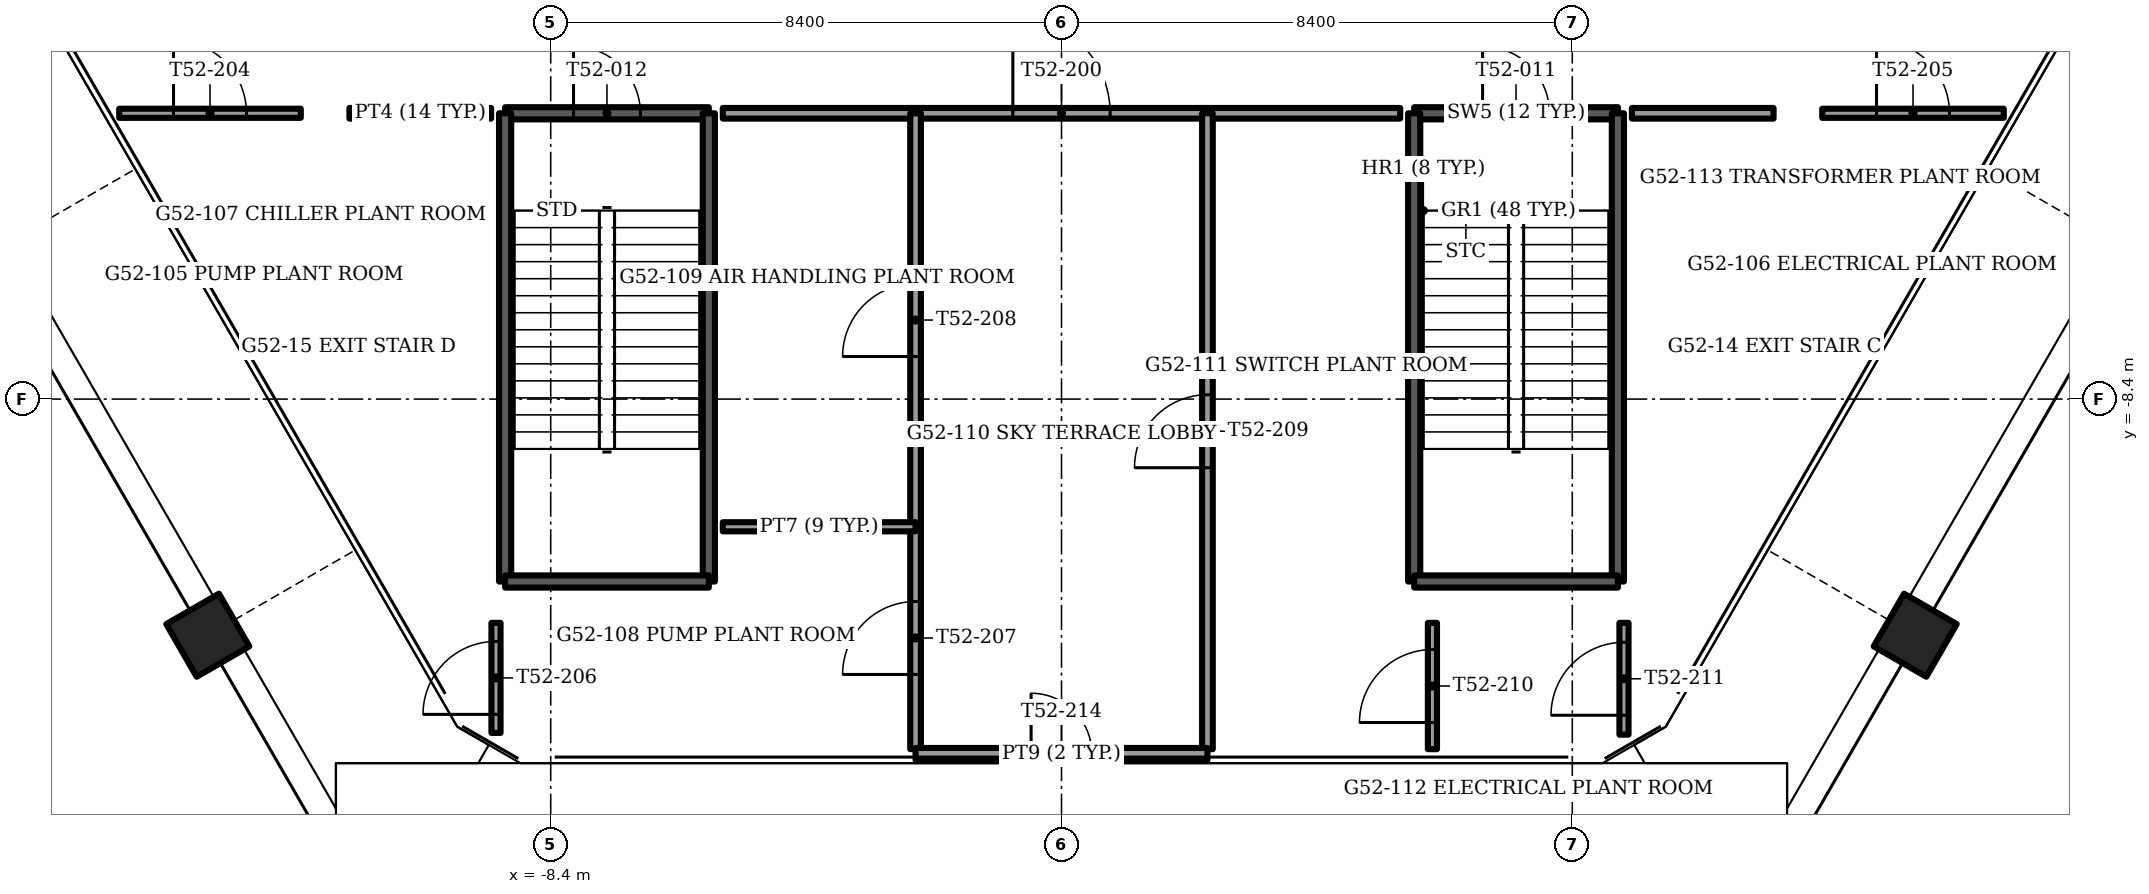
"""IFC4 building model, lengths in metres.
Left out: names, types, materials, properties, quantities, classifications, styles, units other than length and angle.
Written with IfcOpenShell. Run it as: python <this file> out.ifc"""

import sys

from ifc_helpers import new_model, si_unit, direction, frame, frame_2d, origin, origin_2d, place, context, subcontext, project, spatial, rectangle, extrude, element, fill, save


model = new_model("IFC4")
c1 = context("Model", 3, precision=1e-05, world=origin(), true_north=direction((0.0, 1.0)))
c2 = subcontext(c1, "Body", "Model", "MODEL_VIEW")
j1 = project(units=[si_unit("LENGTHUNIT", "METRE"), si_unit("PLANEANGLEUNIT", "RADIAN")], contexts=[c1])
p1 = place(None, origin())
s1 = spatial("IfcSite", under=j1, at=p1, CompositionType="ELEMENT")
p2 = place(p1, origin())
s2 = spatial("IfcBuilding", under=s1, at=p2, CompositionType="ELEMENT")
p3 = place(p2, frame((0.0, 0.0, 209.5)))
s3 = spatial("IfcBuildingStorey", under=s2, at=p3, CompositionType="ELEMENT", Elevation=209.5)
for number, where, z_axis, x_axis in (
    (1, (-14.039, -12.283, -1.2), (0.0, 0.0, 1.0), (-0.5, 0.866, 0.0)),
    (2, (14.039, -12.283, -1.2), (0.0, 0.0, 1.0), (-0.5, -0.866, 0.0)),
):
    element("IfcColumn", number, at=place(p3, frame(where, z_axis=z_axis, x_axis=x_axis)), inside=s3, PredefinedType="COLUMN", context=c2, shape_type="SweptSolid", body=[
        extrude(rectangle(XDim=1.0, YDim=1.0, at=origin_2d()), origin(), (0.0, 0.0, 1.0), 5.0),
    ])
p4 = place(p3, frame((5.8, -3.7, -0.3), z_axis=(0.0, 0.0, 1.0), x_axis=(1.0, 0.0, 0.0)))
e3 = element("IfcWall", 3, at=p4, inside=s3, PredefinedType="SOLIDWALL", context=c2, shape_type="SweptSolid", body=[
    extrude(rectangle(XDim=3.35, YDim=0.2, at=frame_2d((1.675, 0.0))), origin(), (0.0, 0.0, 1.0), 5.0),
])
p5 = place(p4, frame((1.125, 0.0, 0.0)))
e4 = element("IfcOpeningElement", 4, at=p5, cuts=e3, PredefinedType="OPENING", context=c2, shape_type="SweptSolid", body=[
    extrude(rectangle(XDim=1.1, YDim=2.1, at=frame_2d((0.55, 1.05))), frame((0.0, 0.1, 0.0), z_axis=(0.0, -1.0, 0.0), x_axis=(1.0, 0.0, 0.0)), (0.0, 0.0, 1.0), 0.2),
])
for number, where, z_axis, x_axis in (
    (5, (5.8, -3.7, -0.3), (0.0, 0.0, 1.0), (0.0, -1.0, 0.0)),
    (6, (9.15, -3.7, -0.3), (0.0, 0.0, 1.0), (0.0, -1.0, 0.0)),
):
    element("IfcWall", number, at=place(p3, frame(where, z_axis=z_axis, x_axis=x_axis)), inside=s3, PredefinedType="SOLIDWALL", context=c2, shape_type="SweptSolid", body=[
        extrude(rectangle(XDim=7.7, YDim=0.2, at=frame_2d((3.85, 0.0))), origin(), (0.0, 0.0, 1.0), 5.0),
    ])
p6 = place(p3, frame((5.8, -11.4, -0.3), z_axis=(0.0, 0.0, 1.0), x_axis=(1.0, 0.0, 0.0)))
e7 = element("IfcWall", 7, at=p6, inside=s3, PredefinedType="SOLIDWALL", context=c2, shape_type="SweptSolid", body=[
    extrude(rectangle(XDim=3.35, YDim=0.2, at=frame_2d((1.675, 0.0))), origin(), (0.0, 0.0, 1.0), 5.0),
])
p7 = place(p3, frame((-9.15, -3.7, -0.3), z_axis=(0.0, 0.0, 1.0), x_axis=(1.0, 0.0, 0.0)))
e8 = element("IfcWall", 8, at=p7, inside=s3, PredefinedType="SOLIDWALL", context=c2, shape_type="SweptSolid", body=[
    extrude(rectangle(XDim=3.35, YDim=0.2, at=frame_2d((1.675, 0.0))), origin(), (0.0, 0.0, 1.0), 5.0),
])
p8 = place(p7, frame((1.125, 0.0, 0.0)))
e9 = element("IfcOpeningElement", 9, at=p8, cuts=e8, PredefinedType="OPENING", context=c2, shape_type="SweptSolid", body=[
    extrude(rectangle(XDim=1.1, YDim=2.1, at=frame_2d((0.55, 1.05))), frame((0.0, 0.1, 0.0), z_axis=(0.0, -1.0, 0.0), x_axis=(1.0, 0.0, 0.0)), (0.0, 0.0, 1.0), 0.2),
])
for number, where, z_axis, x_axis in (
    (10, (-9.15, -3.7, -0.3), (0.0, 0.0, 1.0), (0.0, -1.0, 0.0)),
    (11, (-5.8, -3.7, -0.3), (0.0, 0.0, 1.0), (0.0, -1.0, 0.0)),
):
    element("IfcWall", number, at=place(p3, frame(where, z_axis=z_axis, x_axis=x_axis)), inside=s3, PredefinedType="SOLIDWALL", context=c2, shape_type="SweptSolid", body=[
        extrude(rectangle(XDim=7.7, YDim=0.2, at=frame_2d((3.85, 0.0))), origin(), (0.0, 0.0, 1.0), 5.0),
    ])
p9 = place(p3, frame((-9.15, -11.4, -0.3), z_axis=(0.0, 0.0, 1.0), x_axis=(1.0, 0.0, 0.0)))
e12 = element("IfcWall", 12, at=p9, inside=s3, PredefinedType="SOLIDWALL", context=c2, shape_type="SweptSolid", body=[
    extrude(rectangle(XDim=3.35, YDim=0.2, at=frame_2d((1.675, 0.0))), origin(), (0.0, 0.0, 1.0), 5.0),
])
p10 = place(p3, frame((-11.71, -3.7, 0.0), z_axis=(0.0, 0.0, 1.0), x_axis=(1.0, 0.0, 0.0)))
e13 = element("IfcWall", 13, at=p10, inside=s3, PredefinedType="PARTITIONING", context=c2, shape_type="SweptSolid", body=[
    extrude(rectangle(XDim=2.33, YDim=0.175, at=frame_2d((1.165, 0.0))), origin(), (0.0, 0.0, 1.0), 4.7),
])
p11 = place(p3, frame((-5.57, -3.7, 0.0), z_axis=(0.0, 0.0, 1.0), x_axis=(1.0, 0.0, 0.0)))
e14 = element("IfcWall", 14, at=p11, inside=s3, PredefinedType="PARTITIONING", context=c2, shape_type="SweptSolid", body=[
    extrude(rectangle(XDim=11.14, YDim=0.175, at=frame_2d((5.57, 0.0))), origin(), (0.0, 0.0, 1.0), 4.7),
])
p12 = place(p11, frame((4.77, 0.0, 0.0)))
e15 = element("IfcOpeningElement", 15, at=p12, cuts=e14, PredefinedType="OPENING", context=c2, shape_type="SweptSolid", body=[
    extrude(rectangle(XDim=1.6, YDim=2.1, at=frame_2d((0.8, 1.05))), frame((0.0, 0.087, 0.0), z_axis=(0.0, -1.0, 0.0), x_axis=(1.0, 0.0, 0.0)), (0.0, 0.0, 1.0), 0.175),
])
p13 = place(p3, frame((9.38, -3.7, 0.0), z_axis=(0.0, 0.0, 1.0), x_axis=(1.0, 0.0, 0.0)))
e16 = element("IfcWall", 16, at=p13, inside=s3, PredefinedType="PARTITIONING", context=c2, shape_type="SweptSolid", body=[
    extrude(rectangle(XDim=2.33, YDim=0.175, at=frame_2d((1.165, 0.0))), origin(), (0.0, 0.0, 1.0), 4.7),
])
p14 = place(p3, frame((-2.4, -14.157, 0.0), z_axis=(0.0, 0.0, 1.0), x_axis=(0.0, 1.0, 0.0)))
e17 = element("IfcWall", 17, at=p14, inside=s3, PredefinedType="PARTITIONING", context=c2, shape_type="SweptSolid", body=[
    extrude(rectangle(XDim=10.457, YDim=0.175, at=frame_2d((5.229, 0.0))), origin(), (0.0, 0.0, 1.0), 4.7),
])
p15 = place(p14, frame((1.229, 0.0, 0.0)))
e18 = element("IfcOpeningElement", 18, at=p15, cuts=e17, PredefinedType="OPENING", context=c2, shape_type="SweptSolid", body=[
    extrude(rectangle(XDim=1.2, YDim=2.1, at=frame_2d((0.6, 1.05))), frame((0.0, 0.087, 0.0), z_axis=(0.0, -1.0, 0.0), x_axis=(1.0, 0.0, 0.0)), (0.0, 0.0, 1.0), 0.175),
])
p16 = place(p14, frame((6.457, 0.0, 0.0)))
e19 = element("IfcOpeningElement", 19, at=p16, cuts=e17, PredefinedType="OPENING", context=c2, shape_type="SweptSolid", body=[
    extrude(rectangle(XDim=1.2, YDim=2.1, at=frame_2d((0.6, 1.05))), frame((0.0, 0.087, 0.0), z_axis=(0.0, -1.0, 0.0), x_axis=(1.0, 0.0, 0.0)), (0.0, 0.0, 1.0), 0.175),
])
p17 = place(p3, frame((2.4, -14.157, 0.0), z_axis=(0.0, 0.0, 1.0), x_axis=(0.0, 1.0, 0.0)))
e20 = element("IfcWall", 20, at=p17, inside=s3, PredefinedType="PARTITIONING", context=c2, shape_type="SweptSolid", body=[
    extrude(rectangle(XDim=10.457, YDim=0.175, at=frame_2d((5.229, 0.0))), origin(), (0.0, 0.0, 1.0), 4.7),
])
p18 = place(p17, frame((4.629, 0.0, 0.0)))
e21 = element("IfcOpeningElement", 21, at=p18, cuts=e20, PredefinedType="OPENING", context=c2, shape_type="SweptSolid", body=[
    extrude(rectangle(XDim=1.2, YDim=2.1, at=frame_2d((0.6, 1.05))), frame((0.0, 0.087, 0.0), z_axis=(0.0, -1.0, 0.0), x_axis=(1.0, 0.0, 0.0)), (0.0, 0.0, 1.0), 0.175),
])
p19 = place(p3, frame((-5.57, -10.5, 0.0), z_axis=(0.0, 0.0, 1.0), x_axis=(1.0, 0.0, 0.0)))
e22 = element("IfcWall", 22, at=p19, inside=s3, PredefinedType="PARTITIONING", context=c2, shape_type="SweptSolid", body=[
    extrude(rectangle(XDim=3.17, YDim=0.15, at=frame_2d((1.585, 0.0))), origin(), (0.0, 0.0, 1.0), 4.7),
])
p20 = place(p3, frame((-15.496, -3.7, 0.0), z_axis=(0.0, 0.0, 1.0), x_axis=(1.0, 0.0, 0.0)))
e23 = element("IfcWall", 23, at=p20, inside=s3, PredefinedType="PARTITIONING", context=c2, shape_type="SweptSolid", body=[
    extrude(rectangle(XDim=2.986, YDim=0.15, at=frame_2d((1.493, 0.0))), origin(), (0.0, 0.0, 1.0), 4.7),
])
p21 = place(p20, frame((0.893, 0.0, 0.0)))
e24 = element("IfcOpeningElement", 24, at=p21, cuts=e23, PredefinedType="OPENING", context=c2, shape_type="SweptSolid", body=[
    extrude(rectangle(XDim=1.2, YDim=2.1, at=frame_2d((0.6, 1.05))), frame((0.0, 0.075, 0.0), z_axis=(0.0, -1.0, 0.0), x_axis=(1.0, 0.0, 0.0)), (0.0, 0.0, 1.0), 0.15),
])
p22 = place(p3, frame((12.51, -3.7, 0.0), z_axis=(0.0, 0.0, 1.0), x_axis=(1.0, 0.0, 0.0)))
e25 = element("IfcWall", 25, at=p22, inside=s3, PredefinedType="PARTITIONING", context=c2, shape_type="SweptSolid", body=[
    extrude(rectangle(XDim=2.986, YDim=0.15, at=frame_2d((1.493, 0.0))), origin(), (0.0, 0.0, 1.0), 4.7),
])
p23 = place(p22, frame((0.893, 0.0, 0.0)))
e26 = element("IfcOpeningElement", 26, at=p23, cuts=e25, PredefinedType="OPENING", context=c2, shape_type="SweptSolid", body=[
    extrude(rectangle(XDim=1.2, YDim=2.1, at=frame_2d((0.6, 1.05))), frame((0.0, 0.075, 0.0), z_axis=(0.0, -1.0, 0.0), x_axis=(1.0, 0.0, 0.0)), (0.0, 0.0, 1.0), 0.15),
])
p24 = place(p3, frame((-9.3, -13.89, 0.0), z_axis=(0.0, 0.0, 1.0), x_axis=(0.0, 1.0, 0.0)))
e27 = element("IfcWall", 27, at=p24, inside=s3, PredefinedType="PARTITIONING", context=c2, shape_type="SweptSolid", body=[
    extrude(rectangle(XDim=1.81, YDim=0.15, at=frame_2d((0.905, 0.0))), origin(), (0.0, 0.0, 1.0), 4.7),
])
p25 = place(p24, frame((0.305, 0.0, 0.0)))
e28 = element("IfcOpeningElement", 28, at=p25, cuts=e27, PredefinedType="OPENING", context=c2, shape_type="SweptSolid", body=[
    extrude(rectangle(XDim=1.2, YDim=2.1, at=frame_2d((0.6, 1.05))), frame((0.0, 0.075, 0.0), z_axis=(0.0, -1.0, 0.0), x_axis=(1.0, 0.0, 0.0)), (0.0, 0.0, 1.0), 0.15),
])
p26 = place(p3, frame((6.1, -14.157, 0.0), z_axis=(0.0, 0.0, 1.0), x_axis=(0.0, 1.0, 0.0)))
e29 = element("IfcWall", 29, at=p26, inside=s3, PredefinedType="PARTITIONING", context=c2, shape_type="SweptSolid", body=[
    extrude(rectangle(XDim=2.077, YDim=0.15, at=frame_2d((1.039, 0.0))), origin(), (0.0, 0.0, 1.0), 4.7),
])
p27 = place(p26, frame((0.439, 0.0, 0.0)))
e30 = element("IfcOpeningElement", 30, at=p27, cuts=e29, PredefinedType="OPENING", context=c2, shape_type="SweptSolid", body=[
    extrude(rectangle(XDim=1.2, YDim=2.1, at=frame_2d((0.6, 1.05))), frame((0.0, 0.075, 0.0), z_axis=(0.0, -1.0, 0.0), x_axis=(1.0, 0.0, 0.0)), (0.0, 0.0, 1.0), 0.15),
])
p28 = place(p3, frame((9.25, -13.919, 0.0), z_axis=(0.0, 0.0, 1.0), x_axis=(0.0, 1.0, 0.0)))
e31 = element("IfcWall", 31, at=p28, inside=s3, PredefinedType="PARTITIONING", context=c2, shape_type="SweptSolid", body=[
    extrude(rectangle(XDim=1.839, YDim=0.15, at=frame_2d((0.919, 0.0))), origin(), (0.0, 0.0, 1.0), 4.7),
])
p29 = place(p28, frame((0.319, 0.0, 0.0)))
e32 = element("IfcOpeningElement", 32, at=p29, cuts=e31, PredefinedType="OPENING", context=c2, shape_type="SweptSolid", body=[
    extrude(rectangle(XDim=1.2, YDim=2.1, at=frame_2d((0.6, 1.05))), frame((0.0, 0.075, 0.0), z_axis=(0.0, -1.0, 0.0), x_axis=(1.0, 0.0, 0.0)), (0.0, 0.0, 1.0), 0.15),
])
p30 = place(p3, frame((-2.4, -14.237, 0.0), z_axis=(0.0, 0.0, 1.0), x_axis=(1.0, 0.0, 0.0)))
e33 = element("IfcWall", 33, at=p30, inside=s3, PredefinedType="PARTITIONING", context=c2, shape_type="SweptSolid", body=[
    extrude(rectangle(XDim=4.8, YDim=0.2, at=frame_2d((2.4, 0.0))), origin(), (0.0, 0.0, 1.0), 4.7),
])
p31 = place(p30, frame((1.9, 0.0, 0.0)))
e34 = element("IfcOpeningElement", 34, at=p31, cuts=e33, PredefinedType="OPENING", context=c2, shape_type="SweptSolid", body=[
    extrude(rectangle(XDim=1.0, YDim=2.1, at=frame_2d((0.5, 1.05))), frame((0.0, 0.1, 0.0), z_axis=(0.0, -1.0, 0.0), x_axis=(1.0, 0.0, 0.0)), (0.0, 0.0, 1.0), 0.2),
])
p32 = place(p5, origin())
e35 = element("IfcDoor", 35, at=p32, inside=s3, OperationType="SINGLE_SWING_LEFT", PredefinedType="DOOR", context=c2, shape_type="SweptSolid", body=[
    extrude(rectangle(XDim=1.1, YDim=2.1, at=frame_2d((0.55, 1.05))), frame((0.0, 0.025, 0.0), z_axis=(0.0, -1.0, 0.0), x_axis=(1.0, 0.0, 0.0)), (0.0, 0.0, 1.0), 0.05),
])
fill(e4, e35)
p33 = place(p8, origin())
e36 = element("IfcDoor", 36, at=p33, inside=s3, OperationType="SINGLE_SWING_LEFT", PredefinedType="DOOR", context=c2, shape_type="SweptSolid", body=[
    extrude(rectangle(XDim=1.1, YDim=2.1, at=frame_2d((0.55, 1.05))), frame((0.0, 0.025, 0.0), z_axis=(0.0, -1.0, 0.0), x_axis=(1.0, 0.0, 0.0)), (0.0, 0.0, 1.0), 0.05),
])
fill(e9, e36)
p34 = place(p12, origin())
e37 = element("IfcDoor", 37, at=p34, inside=s3, OperationType="DOUBLE_DOOR_SINGLE_SWING", PredefinedType="DOOR", context=c2, shape_type="SweptSolid", body=[
    extrude(rectangle(XDim=1.6, YDim=2.1, at=frame_2d((0.8, 1.05))), frame((0.0, 0.025, 0.0), z_axis=(0.0, -1.0, 0.0), x_axis=(1.0, 0.0, 0.0)), (0.0, 0.0, 1.0), 0.05),
])
fill(e15, e37)
p35 = place(p21, origin())
e38 = element("IfcDoor", 38, at=p35, inside=s3, OperationType="SINGLE_SWING_RIGHT", PredefinedType="DOOR", context=c2, shape_type="SweptSolid", body=[
    extrude(rectangle(XDim=1.2, YDim=2.1, at=frame_2d((0.6, 1.05))), frame((0.0, 0.025, 0.0), z_axis=(0.0, -1.0, 0.0), x_axis=(1.0, 0.0, 0.0)), (0.0, 0.0, 1.0), 0.05),
])
fill(e24, e38)
p36 = place(p23, origin())
e39 = element("IfcDoor", 39, at=p36, inside=s3, OperationType="SINGLE_SWING_LEFT", PredefinedType="DOOR", context=c2, shape_type="SweptSolid", body=[
    extrude(rectangle(XDim=1.2, YDim=2.1, at=frame_2d((0.6, 1.05))), frame((0.0, 0.025, 0.0), z_axis=(0.0, -1.0, 0.0), x_axis=(1.0, 0.0, 0.0)), (0.0, 0.0, 1.0), 0.05),
])
fill(e26, e39)
p37 = place(p25, origin())
e40 = element("IfcDoor", 40, at=p37, inside=s3, OperationType="SINGLE_SWING_RIGHT", PredefinedType="DOOR", context=c2, shape_type="SweptSolid", body=[
    extrude(rectangle(XDim=1.2, YDim=2.1, at=frame_2d((0.6, 1.05))), frame((0.0, 0.025, 0.0), z_axis=(0.0, -1.0, 0.0), x_axis=(1.0, 0.0, 0.0)), (0.0, 0.0, 1.0), 0.05),
])
fill(e28, e40)
p38 = place(p15, origin())
e41 = element("IfcDoor", 41, at=p38, inside=s3, OperationType="SINGLE_SWING_LEFT", PredefinedType="DOOR", context=c2, shape_type="SweptSolid", body=[
    extrude(rectangle(XDim=1.2, YDim=2.1, at=frame_2d((0.6, 1.05))), frame((0.0, 0.025, 0.0), z_axis=(0.0, -1.0, 0.0), x_axis=(1.0, 0.0, 0.0)), (0.0, 0.0, 1.0), 0.05),
])
fill(e18, e41)
p39 = place(p16, origin())
e42 = element("IfcDoor", 42, at=p39, inside=s3, OperationType="SINGLE_SWING_RIGHT", PredefinedType="DOOR", context=c2, shape_type="SweptSolid", body=[
    extrude(rectangle(XDim=1.2, YDim=2.1, at=frame_2d((0.6, 1.05))), frame((0.0, 0.025, 0.0), z_axis=(0.0, -1.0, 0.0), x_axis=(1.0, 0.0, 0.0)), (0.0, 0.0, 1.0), 0.05),
])
fill(e19, e42)
p40 = place(p18, origin())
e43 = element("IfcDoor", 43, at=p40, inside=s3, OperationType="SINGLE_SWING_LEFT", PredefinedType="DOOR", context=c2, shape_type="SweptSolid", body=[
    extrude(rectangle(XDim=1.2, YDim=2.1, at=frame_2d((0.6, 1.05))), frame((0.0, 0.025, 0.0), z_axis=(0.0, -1.0, 0.0), x_axis=(1.0, 0.0, 0.0)), (0.0, 0.0, 1.0), 0.05),
])
fill(e21, e43)
p41 = place(p27, origin())
e44 = element("IfcDoor", 44, at=p41, inside=s3, OperationType="SINGLE_SWING_RIGHT", PredefinedType="DOOR", context=c2, shape_type="SweptSolid", body=[
    extrude(rectangle(XDim=1.2, YDim=2.1, at=frame_2d((0.6, 1.05))), frame((0.0, 0.025, 0.0), z_axis=(0.0, -1.0, 0.0), x_axis=(1.0, 0.0, 0.0)), (0.0, 0.0, 1.0), 0.05),
])
fill(e30, e44)
p42 = place(p29, origin())
e45 = element("IfcDoor", 45, at=p42, inside=s3, OperationType="SINGLE_SWING_LEFT", PredefinedType="DOOR", context=c2, shape_type="SweptSolid", body=[
    extrude(rectangle(XDim=1.2, YDim=2.1, at=frame_2d((0.6, 1.05))), frame((0.0, 0.025, 0.0), z_axis=(0.0, -1.0, 0.0), x_axis=(1.0, 0.0, 0.0)), (0.0, 0.0, 1.0), 0.05),
])
fill(e32, e45)
p43 = place(p31, origin())
e46 = element("IfcDoor", 46, at=p43, inside=s3, OperationType="SINGLE_SWING_LEFT", PredefinedType="DOOR", context=c2, shape_type="SweptSolid", body=[
    extrude(rectangle(XDim=1.0, YDim=2.1, at=frame_2d((0.5, 1.05))), frame((0.0, 0.025, 0.0), z_axis=(0.0, -1.0, 0.0), x_axis=(1.0, 0.0, 0.0)), (0.0, 0.0, 1.0), 0.05),
])
fill(e34, e46)
save(model, sys.argv[1])
